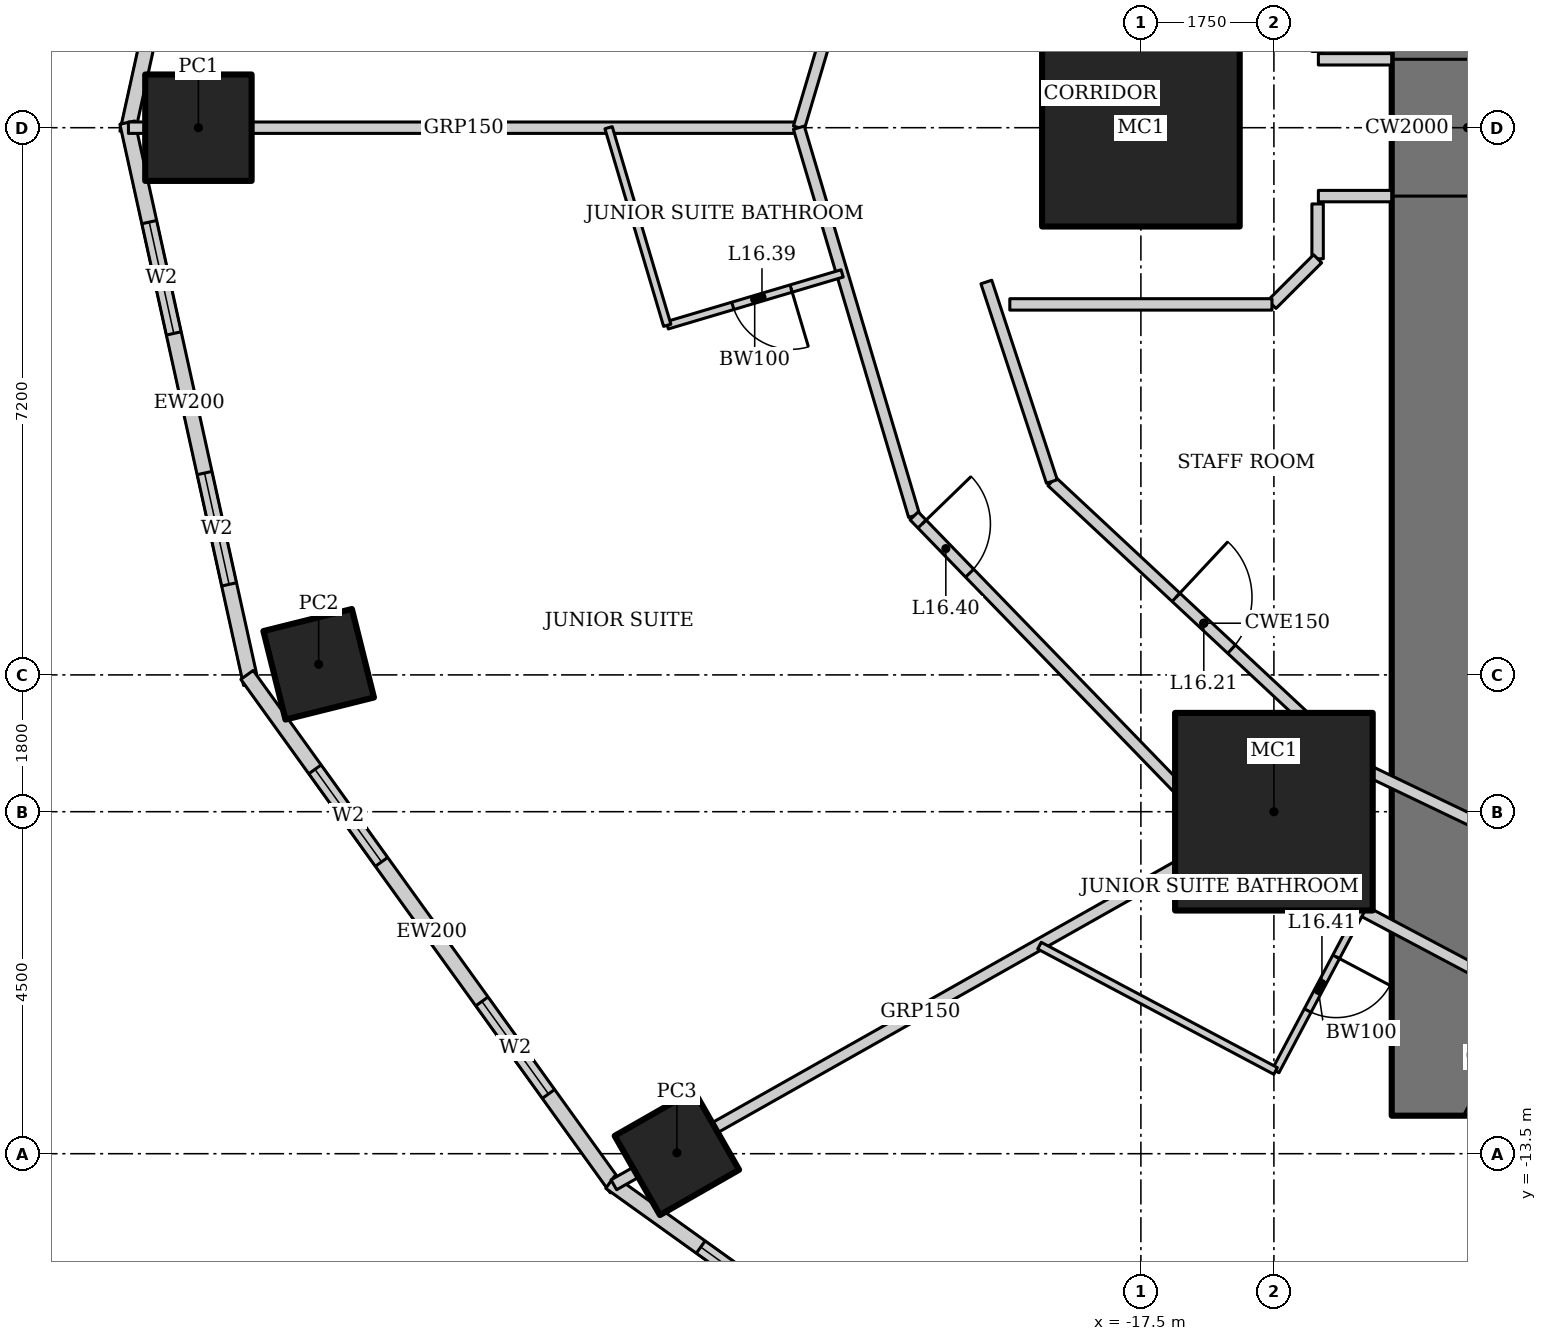
"""IFC4 building model, lengths in metres.
Left out: names, types, materials, properties, quantities, classifications, styles, units other than length and angle.
Written with IfcOpenShell. Run it as: python <this file> out.ifc"""

import sys

from ifc_helpers import new_model, si_unit, direction, frame, frame_2d, origin, origin_2d, place, context, subcontext, project, spatial, rectangle, hollow_rectangle, extrude, element, fill, save


model = new_model("IFC4")
c1 = context("Model", 3, precision=1e-05, world=origin(), true_north=direction((0.0, 1.0)))
c2 = subcontext(c1, "Body", "Model", "MODEL_VIEW")
j1 = project(units=[si_unit("LENGTHUNIT", "METRE"), si_unit("PLANEANGLEUNIT", "RADIAN")], contexts=[c1])
p1 = place(None, origin())
s1 = spatial("IfcSite", under=j1, at=p1, CompositionType="ELEMENT")
p2 = place(p1, origin())
s2 = spatial("IfcBuilding", under=s1, at=p2, CompositionType="ELEMENT")
p3 = place(p2, frame((0.0, 0.0, 73.0)))
s3 = spatial("IfcBuildingStorey", under=s2, at=p3, CompositionType="ELEMENT", Elevation=73.0)
for number, where, z_axis, x_axis in (
    (1, (-17.5, 0.0, 0.0), (0.0, 0.0, 1.0), (1.0, 0.0, 0.0)),
    (2, (-15.75, -9.0, 0.0), (0.0, 0.0, 1.0), (1.0, 0.0, 0.0)),
):
    element("IfcColumn", number, at=place(p3, frame(where, z_axis=z_axis, x_axis=x_axis)), inside=s3, PredefinedType="COLUMN", context=c2, shape_type="SweptSolid", body=[
        extrude(hollow_rectangle(XDim=2.6, YDim=2.6, WallThickness=0.13, at=origin_2d()), origin(), (0.0, 0.0, 1.0), 3.6),
    ])
p4 = place(p3, frame((-29.9, 0.0, 0.0), z_axis=(0.0, 0.0, 1.0), x_axis=(1.0, 0.0, 0.0)))
e3 = element("IfcColumn", 3, at=p4, inside=s3, PredefinedType="COLUMN", context=c2, shape_type="SweptSolid", body=[
    extrude(hollow_rectangle(XDim=1.4, YDim=1.4, WallThickness=0.1, at=origin_2d()), origin(), (0.0, 0.0, 1.0), 3.6),
])
p5 = place(p3, frame((-28.318, -7.06, 0.0), z_axis=(0.0, 0.0, 1.0), x_axis=(0.970295726276, 0.2419218956, 0.0)))
e4 = element("IfcColumn", 4, at=p5, inside=s3, PredefinedType="COLUMN", context=c2, shape_type="SweptSolid", body=[
    extrude(hollow_rectangle(XDim=1.2, YDim=1.2, WallThickness=0.1, at=origin_2d()), origin(), (0.0, 0.0, 1.0), 3.6),
])
p6 = place(p3, frame((-23.605, -13.489, 0.0), z_axis=(0.0, 0.0, 1.0), x_axis=(0.86824298017, 0.496139221777, 0.0)))
e5 = element("IfcColumn", 5, at=p6, inside=s3, PredefinedType="COLUMN", context=c2, shape_type="SweptSolid", body=[
    extrude(hollow_rectangle(XDim=1.2, YDim=1.2, WallThickness=0.12, at=origin_2d()), origin(), (0.0, 0.0, 1.0), 3.6),
])
p7 = place(p3, frame((-13.2, 13.0, 0.0), z_axis=(0.0, 0.0, 1.0), x_axis=(0.0, -1.0, 0.0)))
e6 = element("IfcWall", 6, at=p7, inside=s3, PredefinedType="SHEAR", context=c2, shape_type="SweptSolid", body=[
    extrude(rectangle(XDim=26.0, YDim=2.0, at=frame_2d((13.0, 0.0))), origin(), (0.0, 0.0, 1.0), 3.6),
])
p8 = place(p7, frame((12.1, 0.0, 0.0)))
e7 = element("IfcOpeningElement", 7, at=p8, cuts=e6, PredefinedType="OPENING", context=c2, shape_type="SweptSolid", body=[
    extrude(rectangle(XDim=1.8, YDim=2.1, at=frame_2d((0.9, 1.05))), frame((0.0, 1.01, 0.0), z_axis=(0.0, -1.0, 0.0), x_axis=(1.0, 0.0, 0.0)), (0.0, 0.0, 1.0), 2.02),
])
p9 = place(p3, frame((-29.208, 7.318, 0.0), z_axis=(0.0, 0.0, 1.0), x_axis=(-0.215238065514, -0.976561608478, 0.0)))
e8 = element("IfcWall", 8, at=p9, inside=s3, PredefinedType="SOLIDWALL", context=c2, shape_type="SweptSolid", body=[
    extrude(rectangle(XDim=7.562, YDim=0.2, at=frame_2d((3.781, 0.0))), origin(), (0.0, 0.0, 1.0), 3.45),
])
p10 = place(p9, frame((1.341, 0.0, 0.5)))
e9 = element("IfcOpeningElement", 9, at=p10, cuts=e8, PredefinedType="OPENING", context=c2, shape_type="SweptSolid", body=[
    extrude(rectangle(XDim=1.5, YDim=2.2, at=frame_2d((0.75, 1.1))), frame((0.0, 0.11, 0.0), z_axis=(0.0, -1.0, 0.0), x_axis=(1.0, 0.0, 0.0)), (0.0, 0.0, 1.0), 0.22),
])
p11 = place(p9, frame((4.722, 0.0, 0.5)))
e10 = element("IfcOpeningElement", 10, at=p11, cuts=e8, PredefinedType="OPENING", context=c2, shape_type="SweptSolid", body=[
    extrude(rectangle(XDim=1.5, YDim=2.2, at=frame_2d((0.75, 1.1))), frame((0.0, 0.11, 0.0), z_axis=(0.0, -1.0, 0.0), x_axis=(1.0, 0.0, 0.0)), (0.0, 0.0, 1.0), 0.22),
])
p12 = place(p3, frame((-30.835, 0.067, 0.0), z_axis=(0.0, 0.0, 1.0), x_axis=(0.215238065514, -0.976561608478, 0.0)))
e11 = element("IfcWall", 11, at=p12, inside=s3, PredefinedType="SOLIDWALL", context=c2, shape_type="SweptSolid", body=[
    extrude(rectangle(XDim=7.562, YDim=0.2, at=frame_2d((3.781, 0.0))), origin(), (0.0, 0.0, 1.0), 3.45),
])
p13 = place(p12, frame((1.341, 0.0, 0.5)))
e12 = element("IfcOpeningElement", 12, at=p13, cuts=e11, PredefinedType="OPENING", context=c2, shape_type="SweptSolid", body=[
    extrude(rectangle(XDim=1.5, YDim=2.2, at=frame_2d((0.75, 1.1))), frame((0.0, 0.11, 0.0), z_axis=(0.0, -1.0, 0.0), x_axis=(1.0, 0.0, 0.0)), (0.0, 0.0, 1.0), 0.22),
])
p14 = place(p12, frame((4.722, 0.0, 0.5)))
e13 = element("IfcOpeningElement", 13, at=p14, cuts=e11, PredefinedType="OPENING", context=c2, shape_type="SweptSolid", body=[
    extrude(rectangle(XDim=1.5, YDim=2.2, at=frame_2d((0.75, 1.1))), frame((0.0, 0.11, 0.0), z_axis=(0.0, -1.0, 0.0), x_axis=(1.0, 0.0, 0.0)), (0.0, 0.0, 1.0), 0.22),
])
p15 = place(p3, frame((-29.26, -7.2, 0.0), z_axis=(0.0, 0.0, 1.0), x_axis=(0.583937613703, -0.811798536155, 0.0)))
e14 = element("IfcWall", 14, at=p15, inside=s3, PredefinedType="SOLIDWALL", context=c2, shape_type="SweptSolid", body=[
    extrude(rectangle(XDim=8.323, YDim=0.2, at=frame_2d((4.162, 0.0))), origin(), (0.0, 0.0, 1.0), 3.45),
])
p16 = place(p15, frame((1.531, 0.0, 0.5)))
e15 = element("IfcOpeningElement", 15, at=p16, cuts=e14, PredefinedType="OPENING", context=c2, shape_type="SweptSolid", body=[
    extrude(rectangle(XDim=1.5, YDim=2.2, at=frame_2d((0.75, 1.1))), frame((0.0, 0.11, 0.0), z_axis=(0.0, -1.0, 0.0), x_axis=(1.0, 0.0, 0.0)), (0.0, 0.0, 1.0), 0.22),
])
p17 = place(p15, frame((5.292, 0.0, 0.5)))
e16 = element("IfcOpeningElement", 16, at=p17, cuts=e14, PredefinedType="OPENING", context=c2, shape_type="SweptSolid", body=[
    extrude(rectangle(XDim=1.5, YDim=2.2, at=frame_2d((0.75, 1.1))), frame((0.0, 0.11, 0.0), z_axis=(0.0, -1.0, 0.0), x_axis=(1.0, 0.0, 0.0)), (0.0, 0.0, 1.0), 0.22),
])
p18 = place(p3, frame((-24.482, -13.875, 0.0), z_axis=(0.0, 0.0, 1.0), x_axis=(0.812791321576, -0.582554948112, 0.0)))
e17 = element("IfcWall", 17, at=p18, inside=s3, PredefinedType="SOLIDWALL", context=c2, shape_type="SweptSolid", body=[
    extrude(rectangle(XDim=8.063, YDim=0.2, at=frame_2d((4.032, 0.0))), origin(), (0.0, 0.0, 1.0), 3.45),
])
p19 = place(p18, frame((1.466, 0.0, 0.5)))
e18 = element("IfcOpeningElement", 18, at=p19, cuts=e17, PredefinedType="OPENING", context=c2, shape_type="SweptSolid", body=[
    extrude(rectangle(XDim=1.5, YDim=2.2, at=frame_2d((0.75, 1.1))), frame((0.0, 0.11, 0.0), z_axis=(0.0, -1.0, 0.0), x_axis=(1.0, 0.0, 0.0)), (0.0, 0.0, 1.0), 0.22),
])
p20 = place(p18, frame((5.097, 0.0, 0.5)))
e19 = element("IfcOpeningElement", 19, at=p20, cuts=e17, PredefinedType="OPENING", context=c2, shape_type="SweptSolid", body=[
    extrude(rectangle(XDim=1.5, YDim=2.2, at=frame_2d((0.75, 1.1))), frame((0.0, 0.11, 0.0), z_axis=(0.0, -1.0, 0.0), x_axis=(1.0, 0.0, 0.0)), (0.0, 0.0, 1.0), 0.22),
])
p21 = place(p3, frame((-30.821, 0.0, 0.0), z_axis=(0.0, 0.0, 1.0), x_axis=(1.0, 0.0, 0.0)))
e20 = element("IfcWall", 20, at=p21, inside=s3, PredefinedType="PARTITIONING", context=c2, shape_type="SweptSolid", body=[
    extrude(rectangle(XDim=8.821, YDim=0.15, at=frame_2d((4.41, 0.0))), origin(), (0.0, 0.0, 1.0), 2.528),
])
p22 = place(p3, frame((-24.435, -13.909, 0.0), z_axis=(0.0, 0.0, 1.0), x_axis=(0.870744406136, 0.491735883563, 0.0)))
e21 = element("IfcWall", 21, at=p22, inside=s3, PredefinedType="PARTITIONING", context=c2, shape_type="SweptSolid", body=[
    extrude(rectangle(XDim=9.263, YDim=0.15, at=frame_2d((4.631, 0.0))), origin(), (0.0, 0.0, 1.0), 2.693),
])
p23 = place(p3, frame((-20.484, 5.107, 0.0), z_axis=(0.0, 0.0, 1.0), x_axis=(-0.284584469409, -0.95865096869, 0.0)))
e22 = element("IfcWall", 22, at=p23, inside=s3, PredefinedType="PARTITIONING", context=c2, shape_type="SweptSolid", body=[
    extrude(rectangle(XDim=5.327, YDim=0.15, at=frame_2d((2.664, 0.0))), origin(), (0.0, 0.0, 1.0), 3.45),
])
p24 = place(p23, frame((0.15, 0.0, 0.0)))
e23 = element("IfcOpeningElement", 23, at=p24, cuts=e22, PredefinedType="OPENING", context=c2, shape_type="SweptSolid", body=[
    extrude(rectangle(XDim=0.9, YDim=2.1, at=frame_2d((0.45, 1.05))), frame((0.0, 0.085, 0.0), z_axis=(0.0, -1.0, 0.0), x_axis=(1.0, 0.0, 0.0)), (0.0, 0.0, 1.0), 0.17),
])
p25 = place(p3, frame((-22.0, 0.0, 0.0), z_axis=(0.0, 0.0, 1.0), x_axis=(0.284584469409, -0.95865096869, 0.0)))
e24 = element("IfcWall", 24, at=p25, inside=s3, PredefinedType="PARTITIONING", context=c2, shape_type="SweptSolid", body=[
    extrude(rectangle(XDim=5.327, YDim=0.15, at=frame_2d((2.664, 0.0))), origin(), (0.0, 0.0, 1.0), 3.45),
])
p26 = place(p3, frame((-20.484, -5.107, 0.0), z_axis=(0.0, 0.0, 1.0), x_axis=(0.695871090686, -0.71816671125, 0.0)))
e25 = element("IfcWall", 25, at=p26, inside=s3, PredefinedType="PARTITIONING", context=c2, shape_type="SweptSolid", body=[
    extrude(rectangle(XDim=5.913, YDim=0.15, at=frame_2d((2.957, 0.0))), origin(), (0.0, 0.0, 1.0), 3.45),
])
p27 = place(p26, frame((0.15, 0.0, 0.0)))
e26 = element("IfcOpeningElement", 26, at=p27, cuts=e25, PredefinedType="OPENING", context=c2, shape_type="SweptSolid", body=[
    extrude(rectangle(XDim=0.9, YDim=2.1, at=frame_2d((0.45, 1.05))), frame((0.0, 0.085, 0.0), z_axis=(0.0, -1.0, 0.0), x_axis=(1.0, 0.0, 0.0)), (0.0, 0.0, 1.0), 0.17),
])
p28 = place(p3, frame((-16.369, -9.354, 0.0), z_axis=(0.0, 0.0, 1.0), x_axis=(0.883334368785, -0.468743419071, 0.0)))
e27 = element("IfcWall", 27, at=p28, inside=s3, PredefinedType="PARTITIONING", context=c2, shape_type="SweptSolid", body=[
    extrude(rectangle(XDim=5.491, YDim=0.15, at=frame_2d((2.746, 0.0))), origin(), (0.0, 0.0, 1.0), 3.45),
])
p29 = place(p3, frame((-18.672, -4.655, 0.0), z_axis=(0.0, 0.0, 1.0), x_axis=(0.731260145007, -0.682098673452, 0.0)))
e28 = element("IfcWall", 28, at=p29, inside=s3, PredefinedType="PARTITIONING", context=c2, shape_type="SweptSolid", body=[
    extrude(rectangle(XDim=5.468, YDim=0.15, at=frame_2d((2.734, 0.0))), origin(), (0.0, 0.0, 1.0), 3.45),
])
p30 = place(p29, frame((2.234, 0.0, 0.0)))
e29 = element("IfcOpeningElement", 29, at=p30, cuts=e28, PredefinedType="OPENING", context=c2, shape_type="SweptSolid", body=[
    extrude(rectangle(XDim=1.0, YDim=2.1, at=frame_2d((0.5, 1.05))), frame((0.0, 0.085, 0.0), z_axis=(0.0, -1.0, 0.0), x_axis=(1.0, 0.0, 0.0)), (0.0, 0.0, 1.0), 0.17),
])
p31 = place(p3, frame((-14.673, -8.385, 0.0), z_axis=(0.0, 0.0, 1.0), x_axis=(0.901869692799, -0.43200816799, 0.0)))
e30 = element("IfcWall", 30, at=p31, inside=s3, PredefinedType="PARTITIONING", context=c2, shape_type="SweptSolid", body=[
    extrude(rectangle(XDim=4.986, YDim=0.15, at=frame_2d((2.493, 0.0))), origin(), (0.0, 0.0, 1.0), 3.45),
])
p32 = place(p3, frame((-21.431, -1.917, 0.0), z_axis=(0.0, 0.0, 1.0), x_axis=(-0.958639927723, -0.284621659356, 0.0)))
e31 = element("IfcWall", 31, at=p32, inside=s3, PredefinedType="PARTITIONING", context=c2, shape_type="SweptSolid", body=[
    extrude(rectangle(XDim=2.4, YDim=0.1, at=frame_2d((1.2, 0.0))), origin(), (0.0, 0.0, 1.0), 3.45),
])
p33 = place(p32, frame((0.7, 0.0, 0.0)))
e32 = element("IfcOpeningElement", 32, at=p33, cuts=e31, PredefinedType="OPENING", context=c2, shape_type="SweptSolid", body=[
    extrude(rectangle(XDim=0.8, YDim=2.1, at=frame_2d((0.4, 1.05))), frame((0.0, 0.06, 0.0), z_axis=(0.0, -1.0, 0.0), x_axis=(1.0, 0.0, 0.0)), (0.0, 0.0, 1.0), 0.12),
])
p34 = place(p3, frame((-23.732, -2.6, 0.0), z_axis=(0.0, 0.0, 1.0), x_axis=(-0.284514277473, 0.958671803025, 0.0)))
e33 = element("IfcWall", 33, at=p34, inside=s3, PredefinedType="PARTITIONING", context=c2, shape_type="SweptSolid", body=[
    extrude(rectangle(XDim=2.712, YDim=0.1, at=frame_2d((1.356, 0.0))), origin(), (0.0, 0.0, 1.0), 3.45),
])
p35 = place(p3, frame((-14.602, -10.291, 0.0), z_axis=(0.0, 0.0, 1.0), x_axis=(-0.468770886208, -0.883319792739, 0.0)))
e34 = element("IfcWall", 34, at=p35, inside=s3, PredefinedType="PARTITIONING", context=c2, shape_type="SweptSolid", body=[
    extrude(rectangle(XDim=2.4, YDim=0.1, at=frame_2d((1.2, 0.0))), origin(), (0.0, 0.0, 1.0), 3.45),
])
p36 = place(p35, frame((0.7, 0.0, 0.0)))
e35 = element("IfcOpeningElement", 35, at=p36, cuts=e34, PredefinedType="OPENING", context=c2, shape_type="SweptSolid", body=[
    extrude(rectangle(XDim=0.8, YDim=2.1, at=frame_2d((0.4, 1.05))), frame((0.0, 0.06, 0.0), z_axis=(0.0, -1.0, 0.0), x_axis=(1.0, 0.0, 0.0)), (0.0, 0.0, 1.0), 0.12),
])
p37 = place(p3, frame((-15.727, -12.411, 0.0), z_axis=(0.0, 0.0, 1.0), x_axis=(-0.88335195308, 0.468710280439, 0.0)))
e36 = element("IfcWall", 36, at=p37, inside=s3, PredefinedType="PARTITIONING", context=c2, shape_type="SweptSolid", body=[
    extrude(rectangle(XDim=3.518, YDim=0.1, at=frame_2d((1.759, 0.0))), origin(), (0.0, 0.0, 1.0), 3.45),
])
p38 = place(p3, frame((-13.2, -13.0, 0.0), z_axis=(0.0, 0.0, 1.0), x_axis=(0.46874717052, 0.88333237806, 0.0)))
e37 = element("IfcWall", 37, at=p38, inside=s3, PredefinedType="PARTITIONING", context=c2, shape_type="SweptSolid", body=[
    extrude(rectangle(XDim=1.735, YDim=0.1, at=frame_2d((0.868, 0.0))), origin(), (0.0, 0.0, 1.0), 3.45),
])
p39 = place(p3, frame((-19.533, -2.03, 0.0), z_axis=(0.0, 0.0, 1.0), x_axis=(0.311929965981, -0.950105097515, 0.0)))
e38 = element("IfcWall", 38, at=p39, inside=s3, PredefinedType="PARTITIONING", context=c2, shape_type="SweptSolid", body=[
    extrude(rectangle(XDim=2.763, YDim=0.15, at=frame_2d((1.381, 0.0))), origin(), (0.0, 0.0, 1.0), 3.45),
])
for number, where, z_axis, x_axis in (
    (39, (-14.2, -0.9, 0.0), (0.0, 0.0, 1.0), (-1.0, 0.0, 0.0)),
    (40, (-14.2, 0.9, 0.0), (0.0, 0.0, 1.0), (-1.0, 0.0, 0.0)),
):
    element("IfcWall", number, at=place(p3, frame(where, z_axis=z_axis, x_axis=x_axis)), inside=s3, PredefinedType="PARTITIONING", context=c2, shape_type="SweptSolid", body=[
        extrude(rectangle(XDim=0.965, YDim=0.15, at=frame_2d((0.482, 0.0))), origin(), (0.0, 0.0, 1.0), 3.45),
    ])
p40 = place(p3, frame((-15.175, -1.003, 0.0), z_axis=(0.0, 0.0, 1.0), x_axis=(0.0, -1.0, 0.0)))
e41 = element("IfcWall", 41, at=p40, inside=s3, PredefinedType="PARTITIONING", context=c2, shape_type="SweptSolid", body=[
    extrude(rectangle(XDim=0.721, YDim=0.15, at=frame_2d((0.361, 0.0))), origin(), (0.0, 0.0, 1.0), 3.45),
])
p41 = place(p3, frame((-15.175, -1.725, 0.0), z_axis=(0.0, 0.0, 1.0), x_axis=(-0.707106781187, -0.707106781187, 0.0)))
e42 = element("IfcWall", 42, at=p41, inside=s3, PredefinedType="PARTITIONING", context=c2, shape_type="SweptSolid", body=[
    extrude(rectangle(XDim=0.849, YDim=0.15, at=frame_2d((0.425, 0.0))), origin(), (0.0, 0.0, 1.0), 3.45),
])
p42 = place(p3, frame((-15.775, -2.325, 0.0), z_axis=(0.0, 0.0, 1.0), x_axis=(-1.0, 0.0, 0.0)))
e43 = element("IfcWall", 43, at=p42, inside=s3, PredefinedType="PARTITIONING", context=c2, shape_type="SweptSolid", body=[
    extrude(rectangle(XDim=3.449, YDim=0.15, at=frame_2d((1.725, 0.0))), origin(), (0.0, 0.0, 1.0), 3.45),
])
p43 = place(p13, origin())
e44 = element("IfcWindow", 44, at=p43, inside=s3, PartitioningType="SINGLE_PANEL", PredefinedType="WINDOW", context=c2, shape_type="SweptSolid", body=[
    extrude(rectangle(XDim=1.5, YDim=2.2, at=frame_2d((0.75, 1.1))), frame((0.0, 0.03, 0.0), z_axis=(0.0, -1.0, 0.0), x_axis=(1.0, 0.0, 0.0)), (0.0, 0.0, 1.0), 0.06),
])
fill(e12, e44)
p44 = place(p14, origin())
e45 = element("IfcWindow", 45, at=p44, inside=s3, PartitioningType="SINGLE_PANEL", PredefinedType="WINDOW", context=c2, shape_type="SweptSolid", body=[
    extrude(rectangle(XDim=1.5, YDim=2.2, at=frame_2d((0.75, 1.1))), frame((0.0, 0.03, 0.0), z_axis=(0.0, -1.0, 0.0), x_axis=(1.0, 0.0, 0.0)), (0.0, 0.0, 1.0), 0.06),
])
fill(e13, e45)
p45 = place(p16, origin())
e46 = element("IfcWindow", 46, at=p45, inside=s3, PartitioningType="SINGLE_PANEL", PredefinedType="WINDOW", context=c2, shape_type="SweptSolid", body=[
    extrude(rectangle(XDim=1.5, YDim=2.2, at=frame_2d((0.75, 1.1))), frame((0.0, 0.03, 0.0), z_axis=(0.0, -1.0, 0.0), x_axis=(1.0, 0.0, 0.0)), (0.0, 0.0, 1.0), 0.06),
])
fill(e15, e46)
p46 = place(p17, origin())
e47 = element("IfcWindow", 47, at=p46, inside=s3, PartitioningType="SINGLE_PANEL", PredefinedType="WINDOW", context=c2, shape_type="SweptSolid", body=[
    extrude(rectangle(XDim=1.5, YDim=2.2, at=frame_2d((0.75, 1.1))), frame((0.0, 0.03, 0.0), z_axis=(0.0, -1.0, 0.0), x_axis=(1.0, 0.0, 0.0)), (0.0, 0.0, 1.0), 0.06),
])
fill(e16, e47)
p47 = place(p19, origin())
e48 = element("IfcWindow", 48, at=p47, inside=s3, PartitioningType="SINGLE_PANEL", PredefinedType="WINDOW", context=c2, shape_type="SweptSolid", body=[
    extrude(rectangle(XDim=1.5, YDim=2.2, at=frame_2d((0.75, 1.1))), frame((0.0, 0.03, 0.0), z_axis=(0.0, -1.0, 0.0), x_axis=(1.0, 0.0, 0.0)), (0.0, 0.0, 1.0), 0.06),
])
fill(e18, e48)
p48 = place(p8, origin())
e49 = element("IfcDoor", 49, at=p48, inside=s3, OperationType="DOUBLE_DOOR_DOUBLE_SWING", PredefinedType="DOOR", context=c2, shape_type="SweptSolid", body=[
    extrude(rectangle(XDim=1.8, YDim=2.1, at=frame_2d((0.9, 1.05))), frame((0.0, 0.025, 0.0), z_axis=(0.0, -1.0, 0.0), x_axis=(1.0, 0.0, 0.0)), (0.0, 0.0, 1.0), 0.05),
])
fill(e7, e49)
p49 = place(p30, origin())
e50 = element("IfcDoor", 50, at=p49, inside=s3, OperationType="SINGLE_SWING_LEFT", PredefinedType="DOOR", context=c2, shape_type="SweptSolid", body=[
    extrude(rectangle(XDim=1.0, YDim=2.1, at=frame_2d((0.5, 1.05))), frame((0.0, 0.025, 0.0), z_axis=(0.0, -1.0, 0.0), x_axis=(1.0, 0.0, 0.0)), (0.0, 0.0, 1.0), 0.05),
])
fill(e29, e50)
p50 = place(p33, origin())
e51 = element("IfcDoor", 51, at=p50, inside=s3, OperationType="SINGLE_SWING_LEFT", PredefinedType="DOOR", context=c2, shape_type="SweptSolid", body=[
    extrude(rectangle(XDim=0.8, YDim=2.1, at=frame_2d((0.4, 1.05))), frame((0.0, 0.025, 0.0), z_axis=(0.0, -1.0, 0.0), x_axis=(1.0, 0.0, 0.0)), (0.0, 0.0, 1.0), 0.05),
])
fill(e32, e51)
p51 = place(p27, origin())
e52 = element("IfcDoor", 52, at=p51, inside=s3, OperationType="SINGLE_SWING_LEFT", PredefinedType="DOOR", context=c2, shape_type="SweptSolid", body=[
    extrude(rectangle(XDim=0.9, YDim=2.1, at=frame_2d((0.45, 1.05))), frame((0.0, 0.025, 0.0), z_axis=(0.0, -1.0, 0.0), x_axis=(1.0, 0.0, 0.0)), (0.0, 0.0, 1.0), 0.05),
])
fill(e26, e52)
p52 = place(p36, origin())
e53 = element("IfcDoor", 53, at=p52, inside=s3, OperationType="SINGLE_SWING_LEFT", PredefinedType="DOOR", context=c2, shape_type="SweptSolid", body=[
    extrude(rectangle(XDim=0.8, YDim=2.1, at=frame_2d((0.4, 1.05))), frame((0.0, 0.025, 0.0), z_axis=(0.0, -1.0, 0.0), x_axis=(1.0, 0.0, 0.0)), (0.0, 0.0, 1.0), 0.05),
])
fill(e35, e53)
save(model, sys.argv[1])
